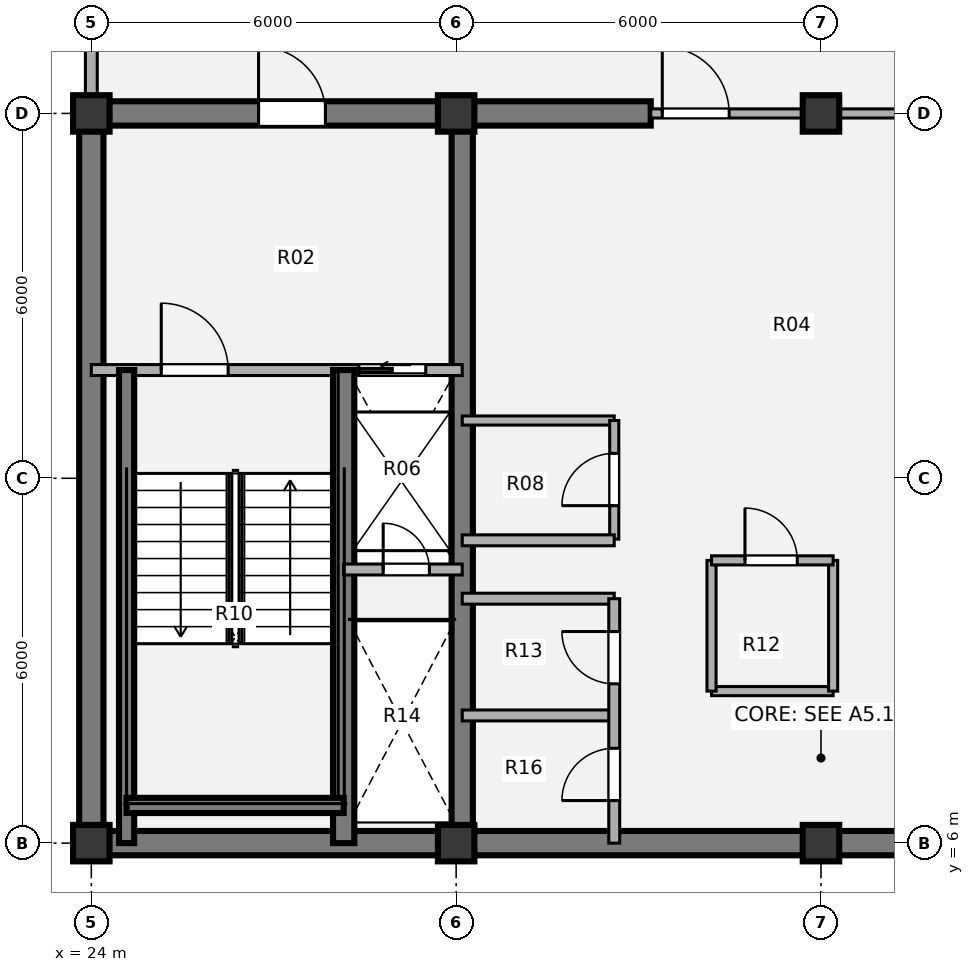
"""IFC4 building model, lengths in metres.
Left out: names, types, materials, properties, quantities, classifications, styles, units other than length and angle.
Written with IfcOpenShell. Run it as: python <this file> out.ifc"""

import sys

from ifc_helpers import new_model, si_unit, direction, frame, frame_2d, origin, origin_2d, place, context, subcontext, project, spatial, rectangle, extrude, source, transform, mapped, element, fill, save


model = new_model("IFC4")
c1 = context("Model", 3, precision=1e-05, world=origin(), true_north=direction((0.0, 1.0)))
c2 = subcontext(c1, "Body", "Model", "MODEL_VIEW")
j1 = project(units=[si_unit("LENGTHUNIT", "METRE"), si_unit("PLANEANGLEUNIT", "RADIAN")], contexts=[c1])
p1 = place(None, origin())
s1 = spatial("IfcSite", under=j1, at=p1, CompositionType="ELEMENT")
p2 = place(p1, origin())
s2 = spatial("IfcBuilding", under=s1, at=p2, CompositionType="ELEMENT")
p3 = place(p2, frame((0.0, 0.0, 303.84)))
s3 = spatial("IfcBuildingStorey", under=s2, at=p3, CompositionType="ELEMENT", Elevation=303.84)
m1 = source(origin(), c2, "Body", "SweptSolid", [
    extrude(rectangle(XDim=0.6, YDim=0.6, at=origin_2d()), origin(), (0.0, 0.0, 1.0), 3.96),
])
for number, where, z_axis, x_axis in (
    (1, (24.0, 6.0, 0.0), (0.0, 0.0, 1.0), (1.0, 0.0, 0.0)),
    (2, (30.0, 6.0, 0.0), (0.0, 0.0, 1.0), (1.0, 0.0, 0.0)),
    (3, (36.0, 6.0, 0.0), (0.0, 0.0, 1.0), (1.0, 0.0, 0.0)),
    (4, (24.0, 18.0, 0.0), (0.0, 0.0, 1.0), (1.0, 0.0, 0.0)),
    (5, (30.0, 18.0, 0.0), (0.0, 0.0, 1.0), (1.0, 0.0, 0.0)),
    (6, (36.0, 18.0, 0.0), (0.0, 0.0, 1.0), (1.0, 0.0, 0.0)),
):
    element("IfcColumn", number, at=place(p3, frame(where, z_axis=z_axis, x_axis=x_axis)), inside=s3, PredefinedType="COLUMN", context=c2, shape_type="MappedRepresentation", body=[
        mapped(m1, transform((0.0, 0.0, 0.0), x_axis=(1.0, 0.0, 0.0), y_axis=(0.0, 1.0, 0.0), z_axis=(0.0, 0.0, 1.0), scale=1.0)),
    ])
p4 = place(p3, frame((48.2, 6.0, 0.0), z_axis=(0.0, 0.0, 1.0), x_axis=(-1.0, 0.0, 0.0)))
e7 = element("IfcWall", 7, at=p4, inside=s3, PredefinedType="SHEAR", context=c2, shape_type="SweptSolid", body=[
    extrude(rectangle(XDim=24.4, YDim=0.4, at=frame_2d((12.2, 0.0))), origin(), (0.0, 0.0, 1.0), 3.96),
])
p5 = place(p3, frame((24.0, 6.0, 0.0), z_axis=(0.0, 0.0, 1.0), x_axis=(0.0, 1.0, 0.0)))
e8 = element("IfcWall", 8, at=p5, inside=s3, PredefinedType="SHEAR", context=c2, shape_type="SweptSolid", body=[
    extrude(rectangle(XDim=12.0, YDim=0.4, at=frame_2d((6.0, 0.0))), origin(), (0.0, 0.0, 1.0), 3.96),
])
p6 = place(p3, frame((23.8, 18.0, 0.0), z_axis=(0.0, 0.0, 1.0), x_axis=(1.0, 0.0, 0.0)))
e9 = element("IfcWall", 9, at=p6, inside=s3, PredefinedType="SHEAR", context=c2, shape_type="SweptSolid", body=[
    extrude(rectangle(XDim=9.4, YDim=0.4, at=frame_2d((4.7, 0.0))), origin(), (0.0, 0.0, 1.0), 3.96),
])
p7 = place(p6, frame((2.95, 0.0, 0.0)))
e10 = element("IfcOpeningElement", 10, at=p7, cuts=e9, PredefinedType="OPENING", context=c2, shape_type="SweptSolid", body=[
    extrude(rectangle(XDim=1.1, YDim=2.1, at=origin_2d()), frame((0.55, 0.21, 1.05), z_axis=(0.0, -1.0, 0.0), x_axis=(1.0, 0.0, 0.0)), (0.0, 0.0, 1.0), 0.42),
])
p8 = place(p3, frame((30.1, 6.0, 0.0), z_axis=(0.0, 0.0, 1.0), x_axis=(0.0, 1.0, 0.0)))
e11 = element("IfcWall", 11, at=p8, inside=s3, PredefinedType="SHEAR", context=c2, shape_type="SweptSolid", body=[
    extrude(rectangle(XDim=12.0, YDim=0.35, at=frame_2d((6.0, 0.0))), origin(), (0.0, 0.0, 1.0), 3.96),
])
p9 = place(p3, frame((24.0, 18.28, 0.0), z_axis=(0.0, 0.0, 1.0), x_axis=(0.0, 1.0, 0.0)))
e12 = element("IfcWall", 12, at=p9, inside=s3, PredefinedType="SOLIDWALL", context=c2, shape_type="SweptSolid", body=[
    extrude(rectangle(XDim=2.77, YDim=0.195, at=frame_2d((1.385, 0.0))), origin(), (0.0, 0.0, 1.0), 2.898),
])
p10 = place(p3, frame((30.1, 12.95, 0.0), z_axis=(0.0, 0.0, 1.0), x_axis=(1.0, 0.0, 0.0)))
e13 = element("IfcWall", 13, at=p10, inside=s3, PredefinedType="PARTITIONING", context=c2, shape_type="SweptSolid", body=[
    extrude(rectangle(XDim=2.5, YDim=0.15, at=frame_2d((1.25, 0.0))), origin(), (0.0, 0.0, 1.0), 3.68),
])
p11 = place(p3, frame((32.6, 11.0, 0.0), z_axis=(0.0, 0.0, 1.0), x_axis=(0.0, 1.0, 0.0)))
e14 = element("IfcWall", 14, at=p11, inside=s3, PredefinedType="PARTITIONING", context=c2, shape_type="SweptSolid", body=[
    extrude(rectangle(XDim=1.95, YDim=0.15, at=frame_2d((0.975, 0.0))), origin(), (0.0, 0.0, 1.0), 3.68),
])
p12 = place(p11, frame((0.55, 0.0, 0.0)))
e15 = element("IfcOpeningElement", 15, at=p12, cuts=e14, PredefinedType="OPENING", context=c2, shape_type="SweptSolid", body=[
    extrude(rectangle(XDim=0.86, YDim=2.1, at=origin_2d()), frame((0.43, 0.085, 1.05), z_axis=(0.0, -1.0, 0.0), x_axis=(1.0, 0.0, 0.0)), (0.0, 0.0, 1.0), 0.17),
])
p13 = place(p3, frame((34.2, 8.5, 0.0), z_axis=(0.0, 0.0, 1.0), x_axis=(1.0, 0.0, 0.0)))
e16 = element("IfcWall", 16, at=p13, inside=s3, PredefinedType="PARTITIONING", context=c2, shape_type="SweptSolid", body=[
    extrude(rectangle(XDim=2.0, YDim=0.15, at=frame_2d((1.0, 0.0))), origin(), (0.0, 0.0, 1.0), 3.68),
])
p14 = place(p3, frame((34.2, 8.5, 0.0), z_axis=(0.0, 0.0, 1.0), x_axis=(0.0, 1.0, 0.0)))
e17 = element("IfcWall", 17, at=p14, inside=s3, PredefinedType="PARTITIONING", context=c2, shape_type="SweptSolid", body=[
    extrude(rectangle(XDim=2.15, YDim=0.15, at=frame_2d((1.075, 0.0))), origin(), (0.0, 0.0, 1.0), 3.68),
])
p15 = place(p3, frame((36.2, 8.5, 0.0), z_axis=(0.0, 0.0, 1.0), x_axis=(0.0, 1.0, 0.0)))
e18 = element("IfcWall", 18, at=p15, inside=s3, PredefinedType="PARTITIONING", context=c2, shape_type="SweptSolid", body=[
    extrude(rectangle(XDim=2.15, YDim=0.15, at=frame_2d((1.075, 0.0))), origin(), (0.0, 0.0, 1.0), 2.895),
])
p16 = place(p3, frame((34.2, 10.65, 0.0), z_axis=(0.0, 0.0, 1.0), x_axis=(1.0, 0.0, 0.0)))
e19 = element("IfcWall", 19, at=p16, inside=s3, PredefinedType="PARTITIONING", context=c2, shape_type="SweptSolid", body=[
    extrude(rectangle(XDim=2.0, YDim=0.15, at=frame_2d((1.0, 0.0))), origin(), (0.0, 0.0, 1.0), 3.68),
])
p17 = place(p16, frame((0.55, 0.0, 0.0)))
e20 = element("IfcOpeningElement", 20, at=p17, cuts=e19, PredefinedType="OPENING", context=c2, shape_type="SweptSolid", body=[
    extrude(rectangle(XDim=0.86, YDim=2.1, at=origin_2d()), frame((0.43, 0.085, 1.05), z_axis=(0.0, -1.0, 0.0), x_axis=(1.0, 0.0, 0.0)), (0.0, 0.0, 1.0), 0.17),
])
for number, where, z_axis, x_axis in (
    (21, (30.1, 10.98, 0.0), (0.0, 0.0, 1.0), (1.0, 0.0, 0.0)),
    (22, (30.1, 8.1, 0.0), (0.0, 0.0, 1.0), (1.0, 0.0, 0.0)),
    (23, (30.1, 10.02, 0.0), (0.0, 0.0, 1.0), (1.0, 0.0, 0.0)),
):
    element("IfcWall", number, at=place(p3, frame(where, z_axis=z_axis, x_axis=x_axis)), inside=s3, PredefinedType="PARTITIONING", context=c2, shape_type="SweptSolid", body=[
        extrude(rectangle(XDim=2.5, YDim=0.18, at=frame_2d((1.25, 0.0))), origin(), (0.0, 0.0, 1.0), 3.68),
    ])
p18 = place(p3, frame((32.6, 6.0, 0.0), z_axis=(0.0, 0.0, 1.0), x_axis=(0.0, 1.0, 0.0)))
e24 = element("IfcWall", 24, at=p18, inside=s3, PredefinedType="PARTITIONING", context=c2, shape_type="SweptSolid", body=[
    extrude(rectangle(XDim=4.02, YDim=0.18, at=frame_2d((2.01, 0.0))), origin(), (0.0, 0.0, 1.0), 3.68),
])
p19 = place(p18, frame((0.7, 0.0, 0.0)))
e25 = element("IfcOpeningElement", 25, at=p19, cuts=e24, PredefinedType="OPENING", context=c2, shape_type="SweptSolid", body=[
    extrude(rectangle(XDim=0.86, YDim=2.1, at=origin_2d()), frame((0.43, 0.1, 1.05), z_axis=(0.0, -1.0, 0.0), x_axis=(1.0, 0.0, 0.0)), (0.0, 0.0, 1.0), 0.2),
])
p20 = place(p18, frame((2.62, 0.0, 0.0)))
e26 = element("IfcOpeningElement", 26, at=p20, cuts=e24, PredefinedType="OPENING", context=c2, shape_type="SweptSolid", body=[
    extrude(rectangle(XDim=0.86, YDim=2.1, at=origin_2d()), frame((0.43, 0.1, 1.05), z_axis=(0.0, -1.0, 0.0), x_axis=(1.0, 0.0, 0.0)), (0.0, 0.0, 1.0), 0.2),
])
p21 = place(p3, frame((33.2, 18.0, 0.0), z_axis=(0.0, 0.0, 1.0), x_axis=(1.0, 0.0, 0.0)))
e27 = element("IfcWall", 27, at=p21, inside=s3, PredefinedType="PARTITIONING", context=c2, shape_type="SweptSolid", body=[
    extrude(rectangle(XDim=5.6, YDim=0.15, at=frame_2d((2.8, 0.0))), origin(), (0.0, 0.0, 1.0), 2.695),
])
p22 = place(p21, frame((0.19, 0.0, 0.0)))
e28 = element("IfcOpeningElement", 28, at=p22, cuts=e27, PredefinedType="OPENING", context=c2, shape_type="SweptSolid", body=[
    extrude(rectangle(XDim=1.1, YDim=2.1, at=origin_2d()), frame((0.55, 0.085, 1.05), z_axis=(0.0, -1.0, 0.0), x_axis=(1.0, 0.0, 0.0)), (0.0, 0.0, 1.0), 0.17),
])
p23 = place(p21, frame((4.31, 0.0, 0.0)))
e29 = element("IfcOpeningElement", 29, at=p23, cuts=e27, PredefinedType="OPENING", context=c2, shape_type="SweptSolid", body=[
    extrude(rectangle(XDim=1.1, YDim=2.1, at=origin_2d()), frame((0.55, 0.085, 1.05), z_axis=(0.0, -1.0, 0.0), x_axis=(1.0, 0.0, 0.0)), (0.0, 0.0, 1.0), 0.17),
])
p24 = place(p3, frame((24.0, 13.78, 0.0), z_axis=(0.0, 0.0, 1.0), x_axis=(1.0, 0.0, 0.0)))
e30 = element("IfcWall", 30, at=p24, inside=s3, PredefinedType="PARTITIONING", context=c2, shape_type="SweptSolid", body=[
    extrude(rectangle(XDim=6.1, YDim=0.18, at=frame_2d((3.05, 0.0))), origin(), (0.0, 0.0, 1.0), 3.68),
])
p25 = place(p24, frame((1.15, 0.0, 0.0)))
e31 = element("IfcOpeningElement", 31, at=p25, cuts=e30, PredefinedType="OPENING", context=c2, shape_type="SweptSolid", body=[
    extrude(rectangle(XDim=1.1, YDim=2.1, at=origin_2d()), frame((0.55, 0.1, 1.05), z_axis=(0.0, -1.0, 0.0), x_axis=(1.0, 0.0, 0.0)), (0.0, 0.0, 1.0), 0.2),
])
p26 = place(p24, frame((4.4, 0.0, 0.0)))
e32 = element("IfcOpeningElement", 32, at=p26, cuts=e30, PredefinedType="OPENING", context=c2, shape_type="SweptSolid", body=[
    extrude(rectangle(XDim=1.1, YDim=2.1, at=origin_2d()), frame((0.55, 0.1, 1.05), z_axis=(0.0, -1.0, 0.0), x_axis=(1.0, 0.0, 0.0)), (0.0, 0.0, 1.0), 0.2),
])
p27 = place(p3, frame((28.15, 6.0, 0.0), z_axis=(0.0, 0.0, 1.0), x_axis=(0.0, 1.0, 0.0)))
e33 = element("IfcWall", 33, at=p27, inside=s3, PredefinedType="SHEAR", context=c2, shape_type="SweptSolid", body=[
    extrude(rectangle(XDim=7.78, YDim=0.35, at=frame_2d((3.89, 0.0))), origin(), (0.0, 0.0, 1.0), 4.03),
])
p28 = place(p3, frame((24.58, 6.0, 0.0), z_axis=(0.0, 0.0, 1.0), x_axis=(0.0, 1.0, 0.0)))
e34 = element("IfcWall", 34, at=p28, inside=s3, PredefinedType="SHEAR", context=c2, shape_type="SweptSolid", body=[
    extrude(rectangle(XDim=7.78, YDim=0.25, at=frame_2d((3.89, 0.0))), origin(), (0.0, 0.0, 1.0), 4.03),
])
p29 = place(p3, frame((24.58, 6.62, 0.0), z_axis=(0.0, 0.0, 1.0), x_axis=(1.0, 0.0, 0.0)))
e35 = element("IfcWall", 35, at=p29, inside=s3, PredefinedType="SHEAR", context=c2, shape_type="SweptSolid", body=[
    extrude(rectangle(XDim=3.57, YDim=0.25, at=frame_2d((1.785, 0.0))), origin(), (0.0, 0.0, 1.0), 4.03),
])
p30 = place(p3, frame((28.15, 10.5, 0.0), z_axis=(0.0, 0.0, 1.0), x_axis=(1.0, 0.0, 0.0)))
e36 = element("IfcWall", 36, at=p30, inside=s3, PredefinedType="PARTITIONING", context=c2, shape_type="SweptSolid", body=[
    extrude(rectangle(XDim=1.95, YDim=0.18, at=frame_2d((0.975, 0.0))), origin(), (0.0, 0.0, 1.0), 3.68),
])
p31 = place(p30, frame((0.65, 0.0, 0.0)))
e37 = element("IfcOpeningElement", 37, at=p31, cuts=e36, PredefinedType="OPENING", context=c2, shape_type="SweptSolid", body=[
    extrude(rectangle(XDim=0.76, YDim=2.05, at=origin_2d()), frame((0.38, 0.1, 1.025), z_axis=(0.0, -1.0, 0.0), x_axis=(1.0, 0.0, 0.0)), (0.0, 0.0, 1.0), 0.2),
])
m2 = source(origin(), c2, "Body", "SweptSolid", [
    extrude(rectangle(XDim=0.86, YDim=2.1, at=origin_2d()), frame((0.43, 0.025, 1.05), z_axis=(0.0, -1.0, 0.0), x_axis=(1.0, 0.0, 0.0)), (0.0, 0.0, 1.0), 0.05),
])
p32 = place(p12, origin())
e38 = element("IfcDoor", 38, at=p32, inside=s3, OperationType="SINGLE_SWING_LEFT", PredefinedType="DOOR", context=c2, shape_type="MappedRepresentation", body=[
    mapped(m2, transform((0.0, 0.0, 0.0), x_axis=(1.0, 0.0, 0.0), y_axis=(0.0, 1.0, 0.0), z_axis=(0.0, 0.0, 1.0), scale=1.0)),
])
fill(e15, e38)
p33 = place(p17, origin())
e39 = element("IfcDoor", 39, at=p33, inside=s3, OperationType="SINGLE_SWING_LEFT", PredefinedType="DOOR", context=c2, shape_type="MappedRepresentation", body=[
    mapped(m2, transform((0.0, 0.0, 0.0), x_axis=(1.0, 0.0, 0.0), y_axis=(0.0, 1.0, 0.0), z_axis=(0.0, 0.0, 1.0), scale=1.0)),
])
fill(e20, e39)
p34 = place(p19, origin())
e40 = element("IfcDoor", 40, at=p34, inside=s3, OperationType="SINGLE_SWING_LEFT", PredefinedType="DOOR", context=c2, shape_type="MappedRepresentation", body=[
    mapped(m2, transform((0.0, 0.0, 0.0), x_axis=(1.0, 0.0, 0.0), y_axis=(0.0, 1.0, 0.0), z_axis=(0.0, 0.0, 1.0), scale=1.0)),
])
fill(e25, e40)
p35 = place(p20, origin())
e41 = element("IfcDoor", 41, at=p35, inside=s3, OperationType="SINGLE_SWING_RIGHT", PredefinedType="DOOR", context=c2, shape_type="MappedRepresentation", body=[
    mapped(m2, transform((0.0, 0.0, 0.0), x_axis=(1.0, 0.0, 0.0), y_axis=(0.0, 1.0, 0.0), z_axis=(0.0, 0.0, 1.0), scale=1.0)),
])
fill(e26, e41)
m3 = source(origin(), c2, "Body", "SweptSolid", [
    extrude(rectangle(XDim=1.1, YDim=2.1, at=origin_2d()), frame((0.55, 0.025, 1.05), z_axis=(0.0, -1.0, 0.0), x_axis=(1.0, 0.0, 0.0)), (0.0, 0.0, 1.0), 0.05),
])
p36 = place(p22, origin())
e42 = element("IfcDoor", 42, at=p36, inside=s3, OperationType="SINGLE_SWING_LEFT", PredefinedType="DOOR", context=c2, shape_type="MappedRepresentation", body=[
    mapped(m3, transform((0.0, 0.0, 0.0), x_axis=(1.0, 0.0, 0.0), y_axis=(0.0, 1.0, 0.0), z_axis=(0.0, 0.0, 1.0), scale=1.0)),
])
fill(e28, e42)
m4 = source(origin(), c2, "Body", "SweptSolid", [
    extrude(rectangle(XDim=1.1, YDim=2.1, at=origin_2d()), frame((0.55, 0.025, 1.05), z_axis=(0.0, -1.0, 0.0), x_axis=(1.0, 0.0, 0.0)), (0.0, 0.0, 1.0), 0.05),
])
p37 = place(p25, origin())
e43 = element("IfcDoor", 43, at=p37, inside=s3, OperationType="SINGLE_SWING_LEFT", PredefinedType="DOOR", context=c2, shape_type="MappedRepresentation", body=[
    mapped(m4, transform((0.0, 0.0, 0.0), x_axis=(1.0, 0.0, 0.0), y_axis=(0.0, 1.0, 0.0), z_axis=(0.0, 0.0, 1.0), scale=1.0)),
])
fill(e31, e43)
m5 = source(origin(), c2, "Body", "SweptSolid", [
    extrude(rectangle(XDim=1.1, YDim=2.1, at=origin_2d()), frame((0.55, 0.025, 1.05), z_axis=(0.0, -1.0, 0.0), x_axis=(1.0, 0.0, 0.0)), (0.0, 0.0, 1.0), 0.05),
])
p38 = place(p26, origin())
e44 = element("IfcDoor", 44, at=p38, inside=s3, OperationType="SLIDING_TO_LEFT", PredefinedType="DOOR", context=c2, shape_type="MappedRepresentation", body=[
    mapped(m5, transform((0.0, 0.0, 0.0), x_axis=(1.0, 0.0, 0.0), y_axis=(0.0, 1.0, 0.0), z_axis=(0.0, 0.0, 1.0), scale=1.0)),
])
fill(e32, e44)
m6 = source(origin(), c2, "Body", "SweptSolid", [
    extrude(rectangle(XDim=0.76, YDim=2.05, at=origin_2d()), frame((0.38, 0.025, 1.025), z_axis=(0.0, -1.0, 0.0), x_axis=(1.0, 0.0, 0.0)), (0.0, 0.0, 1.0), 0.05),
])
p39 = place(p31, origin())
e45 = element("IfcDoor", 45, at=p39, inside=s3, OperationType="SINGLE_SWING_LEFT", PredefinedType="DOOR", context=c2, shape_type="MappedRepresentation", body=[
    mapped(m6, transform((0.0, 0.0, 0.0), x_axis=(1.0, 0.0, 0.0), y_axis=(0.0, 1.0, 0.0), z_axis=(0.0, 0.0, 1.0), scale=1.0)),
])
fill(e37, e45)
p40 = place(p7, origin())
e46 = element("IfcDoor", 46, at=p40, inside=s3, OperationType="SINGLE_SWING_LEFT", PredefinedType="DOOR", context=c2, shape_type="MappedRepresentation", body=[
    mapped(m3, transform((0.0, 0.0, 0.0), x_axis=(1.0, 0.0, 0.0), y_axis=(0.0, 1.0, 0.0), z_axis=(0.0, 0.0, 1.0), scale=1.0)),
])
fill(e10, e46)
save(model, sys.argv[1])
